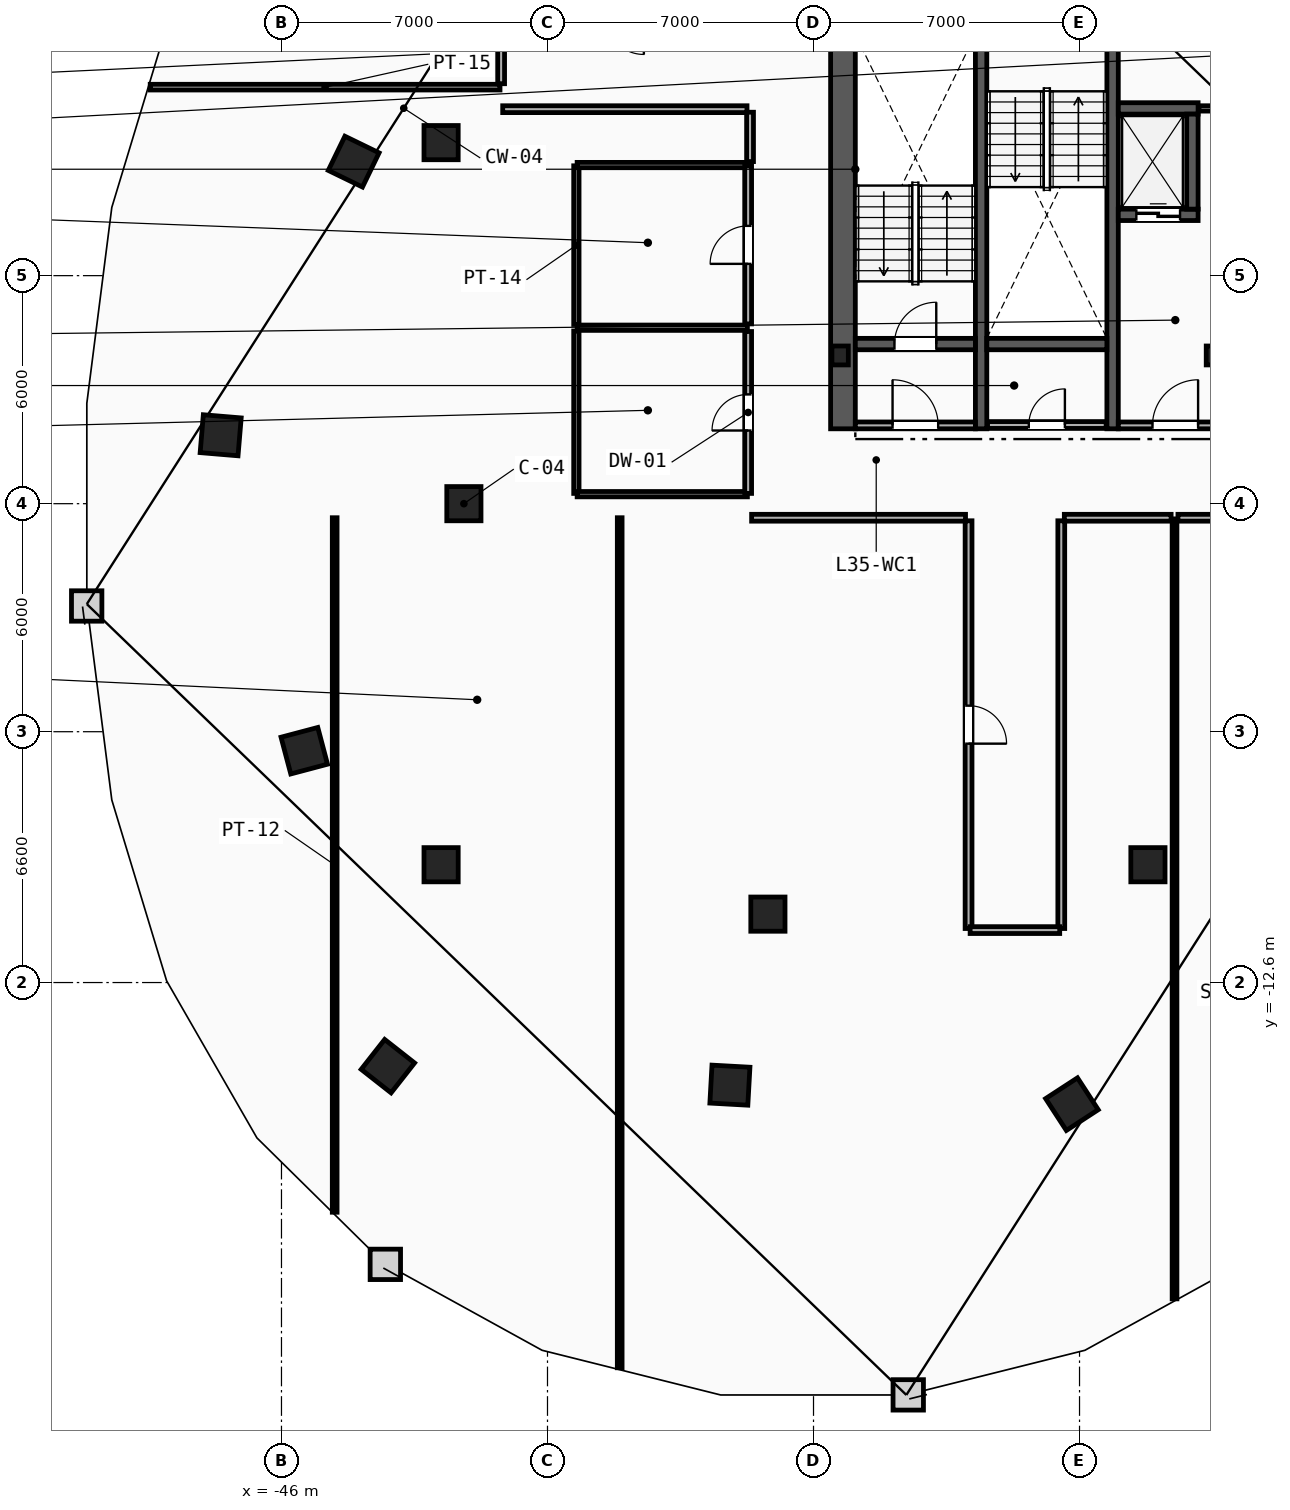
"""IFC4 building model, lengths in metres.
Left out: names, types, materials, properties, quantities, classifications, styles, units other than length and angle.
Written with IfcOpenShell. Run it as: python <this file> out.ifc"""

import sys

from ifc_helpers import new_model, si_unit, direction, frame, frame_2d, origin, origin_2d, place, context, subcontext, project, spatial, rectangle, i_section, extrude, element, fill, save


model = new_model("IFC4")
c1 = context("Model", 3, precision=1e-05, world=origin(), true_north=direction((0.0, 1.0)))
c2 = subcontext(c1, "Body", "Model", "MODEL_VIEW")
j1 = project(units=[si_unit("LENGTHUNIT", "METRE"), si_unit("PLANEANGLEUNIT", "RADIAN")], contexts=[c1])
p1 = place(None, origin())
s1 = spatial("IfcSite", under=j1, at=p1, CompositionType="ELEMENT")
p2 = place(p1, origin())
s2 = spatial("IfcBuilding", under=s1, at=p2, CompositionType="ELEMENT")
p3 = place(p2, frame((0.0, 0.0, 136.8)))
s3 = spatial("IfcBuildingStorey", under=s2, at=p3, CompositionType="ELEMENT", Elevation=136.8)
for number, where, z_axis, x_axis in (
    (1, (-31.3, 3.9, 0.0), (0.0, 0.0, 1.0), (1.0, 0.0, 0.0)),
    (2, (-21.45, 3.9, 0.0), (0.0, 0.0, 1.0), (1.0, 0.0, 0.0)),
):
    element("IfcColumn", number, at=place(p3, frame(where, z_axis=z_axis, x_axis=x_axis)), inside=s3, PredefinedType="COLUMN", context=c2, shape_type="SweptSolid", body=[
        extrude(i_section(OverallWidth=0.432, OverallDepth=0.498, WebThickness=0.056, FlangeThickness=0.089, FilletRadius=0.018, at=origin_2d()), origin(), (0.0, 0.0, 1.0), 3.6),
    ])
for number, where, z_axis, x_axis in (
    (3, (-41.2, 0.0, 0.0), (0.0, 0.0, 1.0), (1.0, 0.0, 0.0)),
    (4, (-41.8, 9.5, 0.0), (0.0, 0.0, 1.0), (1.0, 0.0, 0.0)),
    (5, (-41.8, -9.5, 0.0), (0.0, 0.0, 1.0), (1.0, 0.0, 0.0)),
    (6, (-33.2, -10.8, 0.0), (0.0, 0.0, 1.0), (1.0, 0.0, 0.0)),
    (7, (-23.2, -9.5, 0.0), (0.0, 0.0, 1.0), (1.0, 0.0, 0.0)),
):
    element("IfcColumn", number, at=place(p3, frame(where, z_axis=z_axis, x_axis=x_axis)), inside=s3, PredefinedType="COLUMN", context=c2, shape_type="SweptSolid", body=[
        extrude(rectangle(XDim=0.9, YDim=0.9, at=origin_2d()), origin(), (0.0, 0.0, 1.0), 3.6),
    ])
for number, where, z_axis, x_axis in (
    (8, (-44.1, 9.0, 0.0), (0.0, 0.0, 1.0), (-0.437, -0.899, 0.0)),
    (9, (-47.6, 1.8, 0.0), (0.0, 0.0, 1.0), (-0.084, -0.997, 0.0)),
    (10, (-45.4, -6.5, 0.0), (0.0, 0.0, 1.0), (0.256, -0.967, 0.0)),
    (11, (-43.2, -14.8, 0.0), (0.0, 0.0, 1.0), (0.786, -0.618, 0.0)),
    (12, (-34.2, -15.3, 0.0), (0.0, 0.0, 1.0), (0.998, -0.055, 0.0)),
    (13, (-25.2, -15.8, 0.0), (0.0, 0.0, 1.0), (0.838, 0.546, 0.0)),
):
    element("IfcColumn", number, at=place(p3, frame(where, z_axis=z_axis, x_axis=x_axis)), inside=s3, PredefinedType="COLUMN", context=c2, shape_type="SweptSolid", body=[
        extrude(rectangle(XDim=1.0, YDim=1.0, at=origin_2d()), origin(), (0.0, 0.0, 1.0), 3.6),
    ])
p4 = place(p3, frame((-31.225, 1.97, 0.0), z_axis=(0.0, 0.0, 1.0), x_axis=(0.0, 1.0, 0.0)))
e14 = element("IfcWall", 14, at=p4, inside=s3, PredefinedType="SHEAR", context=c2, shape_type="SweptSolid", body=[
    extrude(rectangle(XDim=13.33, YDim=0.65, at=frame_2d((6.665, 0.0))), origin(), (0.0, 0.0, 1.0), 3.36),
])
for number, where, z_axis, x_axis in (
    (15, (-27.59, 1.97, 0.0), (0.0, 0.0, 1.0), (0.0, 1.0, 0.0)),
    (16, (-24.13, 1.97, 0.0), (0.0, 0.0, 1.0), (0.0, 1.0, 0.0)),
):
    element("IfcWall", number, at=place(p3, frame(where, z_axis=z_axis, x_axis=x_axis)), inside=s3, PredefinedType="SHEAR", context=c2, shape_type="SweptSolid", body=[
        extrude(rectangle(XDim=10.68, YDim=0.3, at=frame_2d((5.34, 0.0))), origin(), (0.0, 0.0, 1.0), 3.36),
    ])
p5 = place(p3, frame((-30.9, 4.2, 0.0), z_axis=(0.0, 0.0, 1.0), x_axis=(1.0, 0.0, 0.0)))
e17 = element("IfcWall", 17, at=p5, inside=s3, PredefinedType="SHEAR", context=c2, shape_type="SweptSolid", body=[
    extrude(rectangle(XDim=3.16, YDim=0.3, at=frame_2d((1.58, 0.0))), origin(), (0.0, 0.0, 1.0), 3.36),
])
p6 = place(p5, frame((1.03, 0.0, 0.0)))
e18 = element("IfcOpeningElement", 18, at=p6, cuts=e17, PredefinedType="OPENING", context=c2, shape_type="SweptSolid", body=[
    extrude(rectangle(XDim=1.1, YDim=2.15, at=frame_2d((0.55, 1.075))), frame((0.0, 0.16, 0.0), z_axis=(0.0, -1.0, 0.0), x_axis=(1.0, 0.0, 0.0)), (0.0, 0.0, 1.0), 0.32),
])
p7 = place(p3, frame((-27.44, 4.2, 0.0), z_axis=(0.0, 0.0, 1.0), x_axis=(1.0, 0.0, 0.0)))
e19 = element("IfcWall", 19, at=p7, inside=s3, PredefinedType="SHEAR", context=c2, shape_type="SweptSolid", body=[
    extrude(rectangle(XDim=3.16, YDim=0.3, at=frame_2d((1.58, 0.0))), origin(), (0.0, 0.0, 1.0), 3.36),
])
p8 = place(p3, frame((-23.98, 2.06, 0.0), z_axis=(0.0, 0.0, 1.0), x_axis=(1.0, 0.0, 0.0)))
e20 = element("IfcWall", 20, at=p8, inside=s3, PredefinedType="PARTITIONING", context=c2, shape_type="SweptSolid", body=[
    extrude(rectangle(XDim=3.0, YDim=0.18, at=frame_2d((1.5, 0.0))), origin(), (0.0, 0.0, 1.0), 3.36),
])
p9 = place(p8, frame((0.9, 0.0, 0.0)))
e21 = element("IfcOpeningElement", 21, at=p9, cuts=e20, PredefinedType="OPENING", context=c2, shape_type="SweptSolid", body=[
    extrude(rectangle(XDim=1.2, YDim=2.15, at=frame_2d((0.6, 1.075))), frame((0.0, 0.1, 0.0), z_axis=(0.0, -1.0, 0.0), x_axis=(1.0, 0.0, 0.0)), (0.0, 0.0, 1.0), 0.2),
])
p10 = place(p3, frame((-30.9, 2.06, 0.0), z_axis=(0.0, 0.0, 1.0), x_axis=(1.0, 0.0, 0.0)))
e22 = element("IfcWall", 22, at=p10, inside=s3, PredefinedType="PARTITIONING", context=c2, shape_type="SweptSolid", body=[
    extrude(rectangle(XDim=3.16, YDim=0.18, at=frame_2d((1.58, 0.0))), origin(), (0.0, 0.0, 1.0), 3.36),
])
p11 = place(p10, frame((0.98, 0.0, 0.0)))
e23 = element("IfcOpeningElement", 23, at=p11, cuts=e22, PredefinedType="OPENING", context=c2, shape_type="SweptSolid", body=[
    extrude(rectangle(XDim=1.2, YDim=2.15, at=frame_2d((0.6, 1.075))), frame((0.0, 0.1, 0.0), z_axis=(0.0, -1.0, 0.0), x_axis=(1.0, 0.0, 0.0)), (0.0, 0.0, 1.0), 0.2),
])
p12 = place(p3, frame((-23.98, 7.6, 0.0), z_axis=(0.0, 0.0, 1.0), x_axis=(1.0, 0.0, 0.0)))
e24 = element("IfcWall", 24, at=p12, inside=s3, PredefinedType="SHEAR", context=c2, shape_type="SweptSolid", body=[
    extrude(rectangle(XDim=2.1, YDim=0.3, at=frame_2d((1.05, 0.0))), origin(), (0.0, 0.0, 1.0), 3.36),
])
p13 = place(p12, frame((0.475, 0.0, 0.0)))
e25 = element("IfcOpeningElement", 25, at=p13, cuts=e24, PredefinedType="OPENING", context=c2, shape_type="SweptSolid", body=[
    extrude(rectangle(XDim=1.15, YDim=2.2, at=frame_2d((0.575, 1.1))), frame((0.0, 0.16, 0.0), z_axis=(0.0, -1.0, 0.0), x_axis=(1.0, 0.0, 0.0)), (0.0, 0.0, 1.0), 0.32),
])
p14 = place(p3, frame((-23.98, 10.4, 0.0), z_axis=(0.0, 0.0, 1.0), x_axis=(1.0, 0.0, 0.0)))
e26 = element("IfcWall", 26, at=p14, inside=s3, PredefinedType="SHEAR", context=c2, shape_type="SweptSolid", body=[
    extrude(rectangle(XDim=2.1, YDim=0.3, at=frame_2d((1.05, 0.0))), origin(), (0.0, 0.0, 1.0), 3.36),
])
p15 = place(p3, frame((-22.03, 7.75, 0.0), z_axis=(0.0, 0.0, 1.0), x_axis=(0.0, 1.0, 0.0)))
e27 = element("IfcWall", 27, at=p15, inside=s3, PredefinedType="SHEAR", context=c2, shape_type="SweptSolid", body=[
    extrude(rectangle(XDim=2.5, YDim=0.3, at=frame_2d((1.25, 0.0))), origin(), (0.0, 0.0, 1.0), 3.36),
])
p16 = place(p3, frame((-21.86, 10.4, 0.0), z_axis=(0.0, 0.0, 1.0), x_axis=(1.0, 0.0, 0.0)))
e28 = element("IfcWall", 28, at=p16, inside=s3, PredefinedType="PARTITIONING", context=c2, shape_type="SweptSolid", body=[
    extrude(rectangle(XDim=0.59, YDim=0.14, at=frame_2d((0.295, 0.0))), origin(), (0.0, 0.0, 1.0), 3.36),
])
p17 = place(p3, frame((-27.42, 2.07, 0.0), z_axis=(0.0, 0.0, 1.0), x_axis=(1.0, 0.0, 0.0)))
e29 = element("IfcWall", 29, at=p17, inside=s3, PredefinedType="PARTITIONING", context=c2, shape_type="SweptSolid", body=[
    extrude(rectangle(XDim=3.12, YDim=0.18, at=frame_2d((1.56, 0.0))), origin(), (0.0, 0.0, 1.0), 3.36),
])
p18 = place(p17, frame((1.085, 0.0, 0.0)))
e30 = element("IfcOpeningElement", 30, at=p18, cuts=e29, PredefinedType="OPENING", context=c2, shape_type="SweptSolid", body=[
    extrude(rectangle(XDim=0.95, YDim=2.1, at=frame_2d((0.475, 1.05))), frame((0.0, 0.1, 0.0), z_axis=(0.0, -1.0, 0.0), x_axis=(1.0, 0.0, 0.0)), (0.0, 0.0, 1.0), 0.2),
])
p19 = place(p3, frame((-38.24, 0.27, 0.0), z_axis=(0.0, 0.0, 1.0), x_axis=(0.0, 1.0, 0.0)))
e31 = element("IfcWall", 31, at=p19, inside=s3, PredefinedType="PARTITIONING", context=c2, shape_type="SweptSolid", body=[
    extrude(rectangle(XDim=4.275, YDim=0.14, at=frame_2d((2.137, 0.0))), origin(), (0.0, 0.0, 1.0), 3.36),
])
p20 = place(p3, frame((-38.24, 4.715, 0.0), z_axis=(0.0, 0.0, 1.0), x_axis=(0.0, 1.0, 0.0)))
e32 = element("IfcWall", 32, at=p20, inside=s3, PredefinedType="PARTITIONING", context=c2, shape_type="SweptSolid", body=[
    extrude(rectangle(XDim=4.175, YDim=0.14, at=frame_2d((2.087, 0.0))), origin(), (0.0, 0.0, 1.0), 3.36),
])
for number, where, z_axis, x_axis in (
    (33, (-38.22, 0.25, 0.0), (0.0, 0.0, 1.0), (1.0, 0.0, 0.0)),
    (34, (-38.22, 4.63, 0.0), (0.0, 0.0, 1.0), (1.0, 0.0, 0.0)),
    (35, (-38.22, 8.91, 0.0), (0.0, 0.0, 1.0), (1.0, 0.0, 0.0)),
):
    element("IfcWall", number, at=place(p3, frame(where, z_axis=z_axis, x_axis=x_axis)), inside=s3, PredefinedType="PARTITIONING", context=c2, shape_type="SweptSolid", body=[
        extrude(rectangle(XDim=4.48, YDim=0.14, at=frame_2d((2.24, 0.0))), origin(), (0.0, 0.0, 1.0), 3.36),
    ])
p21 = place(p3, frame((-33.72, 0.27, 0.0), z_axis=(0.0, 0.0, 1.0), x_axis=(0.0, 1.0, 0.0)))
e36 = element("IfcWall", 36, at=p21, inside=s3, PredefinedType="PARTITIONING", context=c2, shape_type="SweptSolid", body=[
    extrude(rectangle(XDim=4.26, YDim=0.18, at=frame_2d((2.13, 0.0))), origin(), (0.0, 0.0, 1.0), 3.36),
])
p22 = place(p21, frame((1.655, 0.0, 0.0)))
e37 = element("IfcOpeningElement", 37, at=p22, cuts=e36, PredefinedType="OPENING", context=c2, shape_type="SweptSolid", body=[
    extrude(rectangle(XDim=0.95, YDim=2.1, at=frame_2d((0.475, 1.05))), frame((0.0, 0.1, 0.0), z_axis=(0.0, -1.0, 0.0), x_axis=(1.0, 0.0, 0.0)), (0.0, 0.0, 1.0), 0.2),
])
p23 = place(p3, frame((-33.72, 4.73, 0.0), z_axis=(0.0, 0.0, 1.0), x_axis=(0.0, 1.0, 0.0)))
e38 = element("IfcWall", 38, at=p23, inside=s3, PredefinedType="PARTITIONING", context=c2, shape_type="SweptSolid", body=[
    extrude(rectangle(XDim=4.16, YDim=0.18, at=frame_2d((2.08, 0.0))), origin(), (0.0, 0.0, 1.0), 3.36),
])
p24 = place(p23, frame((1.58, 0.0, 0.0)))
e39 = element("IfcOpeningElement", 39, at=p24, cuts=e38, PredefinedType="OPENING", context=c2, shape_type="SweptSolid", body=[
    extrude(rectangle(XDim=1.0, YDim=2.15, at=frame_2d((0.5, 1.075))), frame((0.0, 0.1, 0.0), z_axis=(0.0, -1.0, 0.0), x_axis=(1.0, 0.0, 0.0)), (0.0, 0.0, 1.0), 0.2),
])
p25 = place(p3, frame((-44.6, -18.644, 0.0), z_axis=(0.0, 0.0, 1.0), x_axis=(0.0, 1.0, 0.0)))
e40 = element("IfcWall", 40, at=p25, inside=s3, PredefinedType="PARTITIONING", context=c2, shape_type="SweptSolid", body=[
    extrude(rectangle(XDim=18.274, YDim=0.125, at=frame_2d((9.137, 0.0))), origin(), (0.0, 0.0, 1.0), 2.665),
])
p26 = place(p3, frame((-37.1, -22.736, 0.0), z_axis=(0.0, 0.0, 1.0), x_axis=(0.0, 1.0, 0.0)))
e41 = element("IfcWall", 41, at=p26, inside=s3, PredefinedType="PARTITIONING", context=c2, shape_type="SweptSolid", body=[
    extrude(rectangle(XDim=22.366, YDim=0.125, at=frame_2d((11.183, 0.0))), origin(), (0.0, 0.0, 1.0), 3.36),
])
p27 = place(p3, frame((-22.5, -20.923, 0.0), z_axis=(0.0, 0.0, 1.0), x_axis=(0.0, 1.0, 0.0)))
e42 = element("IfcWall", 42, at=p27, inside=s3, PredefinedType="PARTITIONING", context=c2, shape_type="SweptSolid", body=[
    extrude(rectangle(XDim=20.523, YDim=0.125, at=frame_2d((10.262, 0.0))), origin(), (0.0, 0.0, 1.0), 2.665),
])
p28 = place(p3, frame((-49.454, 10.96, 0.0), z_axis=(0.0, 0.0, 1.0), x_axis=(1.0, 0.0, 0.0)))
e43 = element("IfcWall", 43, at=p28, inside=s3, PredefinedType="PARTITIONING", context=c2, shape_type="SweptSolid", body=[
    extrude(rectangle(XDim=9.204, YDim=0.15, at=frame_2d((4.602, 0.0))), origin(), (0.0, 0.0, 1.0), 3.36),
])
p29 = place(p3, frame((-27.92, -0.45, 0.0), z_axis=(0.0, 0.0, 1.0), x_axis=(0.0, -1.0, 0.0)))
e44 = element("IfcWall", 44, at=p29, inside=s3, PredefinedType="PARTITIONING", context=c2, shape_type="SweptSolid", body=[
    extrude(rectangle(XDim=10.729, YDim=0.18, at=frame_2d((5.364, 0.0))), origin(), (0.0, 0.0, 1.0), 3.36),
])
p30 = place(p29, frame((4.864, 0.0, 0.0)))
e45 = element("IfcOpeningElement", 45, at=p30, cuts=e44, PredefinedType="OPENING", context=c2, shape_type="SweptSolid", body=[
    extrude(rectangle(XDim=1.0, YDim=2.15, at=frame_2d((0.5, 1.075))), frame((0.0, 0.1, 0.0), z_axis=(0.0, -1.0, 0.0), x_axis=(1.0, 0.0, 0.0)), (0.0, 0.0, 1.0), 0.2),
])
p31 = place(p3, frame((-25.48, -11.178, 0.0), z_axis=(0.0, 0.0, 1.0), x_axis=(0.0, 1.0, 0.0)))
e46 = element("IfcWall", 46, at=p31, inside=s3, PredefinedType="PARTITIONING", context=c2, shape_type="SweptSolid", body=[
    extrude(rectangle(XDim=10.729, YDim=0.18, at=frame_2d((5.364, 0.0))), origin(), (0.0, 0.0, 1.0), 3.36),
])
p32 = place(p3, frame((-40.178, 10.38, 0.0), z_axis=(0.0, 0.0, 1.0), x_axis=(1.0, 0.0, 0.0)))
e47 = element("IfcWall", 47, at=p32, inside=s3, PredefinedType="PARTITIONING", context=c2, shape_type="SweptSolid", body=[
    extrude(rectangle(XDim=6.428, YDim=0.18, at=frame_2d((3.214, 0.0))), origin(), (0.0, 0.0, 1.0), 3.36),
])
p33 = place(p3, frame((-33.628, -0.37, 0.0), z_axis=(0.0, 0.0, 1.0), x_axis=(1.0, 0.0, 0.0)))
e48 = element("IfcWall", 48, at=p33, inside=s3, PredefinedType="PARTITIONING", context=c2, shape_type="SweptSolid", body=[
    extrude(rectangle(XDim=5.628, YDim=0.18, at=frame_2d((2.814, 0.0))), origin(), (0.0, 0.0, 1.0), 3.36),
])
p34 = place(p3, frame((-25.4, -0.37, 0.0), z_axis=(0.0, 0.0, 1.0), x_axis=(1.0, 0.0, 0.0)))
e49 = element("IfcWall", 49, at=p34, inside=s3, PredefinedType="PARTITIONING", context=c2, shape_type="SweptSolid", body=[
    extrude(rectangle(XDim=2.81, YDim=0.18, at=frame_2d((1.405, 0.0))), origin(), (0.0, 0.0, 1.0), 3.36),
])
p35 = place(p3, frame((-27.878, -11.22, 0.0), z_axis=(0.0, 0.0, 1.0), x_axis=(1.0, 0.0, 0.0)))
e50 = element("IfcWall", 50, at=p35, inside=s3, PredefinedType="PARTITIONING", context=c2, shape_type="SweptSolid", body=[
    extrude(rectangle(XDim=2.357, YDim=0.18, at=frame_2d((1.178, 0.0))), origin(), (0.0, 0.0, 1.0), 3.36),
])
p36 = place(p3, frame((-33.67, 10.3, 0.0), z_axis=(0.0, 0.0, 1.0), x_axis=(0.0, -1.0, 0.0)))
e51 = element("IfcWall", 51, at=p36, inside=s3, PredefinedType="PARTITIONING", context=c2, shape_type="SweptSolid", body=[
    extrude(rectangle(XDim=1.299, YDim=0.18, at=frame_2d((0.649, 0.0))), origin(), (0.0, 0.0, 1.0), 3.36),
])
p37 = place(p3, frame((-22.41, -0.37, 0.0), z_axis=(0.0, 0.0, 1.0), x_axis=(1.0, 0.0, 0.0)))
e52 = element("IfcWall", 52, at=p37, inside=s3, PredefinedType="PARTITIONING", context=c2, shape_type="SweptSolid", body=[
    extrude(rectangle(XDim=5.588, YDim=0.18, at=frame_2d((2.794, 0.0))), origin(), (0.0, 0.0, 1.0), 3.36),
])
p38 = place(p37, frame((2.294, 0.0, 0.0)))
e53 = element("IfcOpeningElement", 53, at=p38, cuts=e52, PredefinedType="OPENING", context=c2, shape_type="SweptSolid", body=[
    extrude(rectangle(XDim=1.0, YDim=2.15, at=frame_2d((0.5, 1.075))), frame((0.0, 0.1, 0.0), z_axis=(0.0, -1.0, 0.0), x_axis=(1.0, 0.0, 0.0)), (0.0, 0.0, 1.0), 0.2),
])
p39 = place(p3, frame((-40.22, 12.779, 0.0), z_axis=(0.0, 0.0, 1.0), x_axis=(0.0, -1.0, 0.0)))
e54 = element("IfcWall", 54, at=p39, inside=s3, PredefinedType="PARTITIONING", context=c2, shape_type="SweptSolid", body=[
    extrude(rectangle(XDim=1.729, YDim=0.18, at=frame_2d((0.864, 0.0))), origin(), (0.0, 0.0, 1.0), 3.36),
])
p40 = place(p6, origin())
e55 = element("IfcDoor", 55, at=p40, inside=s3, OperationType="SINGLE_SWING_RIGHT", PredefinedType="DOOR", context=c2, shape_type="SweptSolid", body=[
    extrude(rectangle(XDim=1.1, YDim=2.15, at=frame_2d((0.55, 1.075))), frame((0.0, 0.025, 0.0), z_axis=(0.0, -1.0, 0.0), x_axis=(1.0, 0.0, 0.0)), (0.0, 0.0, 1.0), 0.05),
])
fill(e18, e55)
p41 = place(p9, origin())
e56 = element("IfcDoor", 56, at=p41, inside=s3, OperationType="SINGLE_SWING_RIGHT", PredefinedType="DOOR", context=c2, shape_type="SweptSolid", body=[
    extrude(rectangle(XDim=1.2, YDim=2.15, at=frame_2d((0.6, 1.075))), frame((0.0, 0.025, 0.0), z_axis=(0.0, -1.0, 0.0), x_axis=(1.0, 0.0, 0.0)), (0.0, 0.0, 1.0), 0.05),
])
fill(e21, e56)
p42 = place(p11, origin())
e57 = element("IfcDoor", 57, at=p42, inside=s3, OperationType="SINGLE_SWING_LEFT", PredefinedType="DOOR", context=c2, shape_type="SweptSolid", body=[
    extrude(rectangle(XDim=1.2, YDim=2.15, at=frame_2d((0.6, 1.075))), frame((0.0, 0.025, 0.0), z_axis=(0.0, -1.0, 0.0), x_axis=(1.0, 0.0, 0.0)), (0.0, 0.0, 1.0), 0.05),
])
fill(e23, e57)
p43 = place(p13, origin())
e58 = element("IfcDoor", 58, at=p43, inside=s3, OperationType="SLIDING_TO_LEFT", PredefinedType="TRAPDOOR", context=c2, shape_type="SweptSolid", body=[
    extrude(rectangle(XDim=1.15, YDim=2.2, at=frame_2d((0.575, 1.1))), frame((0.0, 0.025, 0.0), z_axis=(0.0, -1.0, 0.0), x_axis=(1.0, 0.0, 0.0)), (0.0, 0.0, 1.0), 0.05),
])
fill(e25, e58)
p44 = place(p30, origin())
e59 = element("IfcDoor", 59, at=p44, inside=s3, OperationType="SINGLE_SWING_RIGHT", PredefinedType="DOOR", context=c2, shape_type="SweptSolid", body=[
    extrude(rectangle(XDim=1.0, YDim=2.15, at=frame_2d((0.5, 1.075))), frame((0.0, 0.025, 0.0), z_axis=(0.0, -1.0, 0.0), x_axis=(1.0, 0.0, 0.0)), (0.0, 0.0, 1.0), 0.05),
])
fill(e45, e59)
p45 = place(p22, origin())
e60 = element("IfcDoor", 60, at=p45, inside=s3, OperationType="SINGLE_SWING_LEFT", PredefinedType="DOOR", context=c2, shape_type="SweptSolid", body=[
    extrude(rectangle(XDim=0.95, YDim=2.1, at=frame_2d((0.475, 1.05))), frame((0.0, 0.025, 0.0), z_axis=(0.0, -1.0, 0.0), x_axis=(1.0, 0.0, 0.0)), (0.0, 0.0, 1.0), 0.05),
])
fill(e37, e60)
p46 = place(p24, origin())
e61 = element("IfcDoor", 61, at=p46, inside=s3, OperationType="SINGLE_SWING_LEFT", PredefinedType="DOOR", context=c2, shape_type="SweptSolid", body=[
    extrude(rectangle(XDim=1.0, YDim=2.15, at=frame_2d((0.5, 1.075))), frame((0.0, 0.025, 0.0), z_axis=(0.0, -1.0, 0.0), x_axis=(1.0, 0.0, 0.0)), (0.0, 0.0, 1.0), 0.05),
])
fill(e39, e61)
p47 = place(p18, origin())
e62 = element("IfcDoor", 62, at=p47, inside=s3, OperationType="SINGLE_SWING_RIGHT", PredefinedType="DOOR", context=c2, shape_type="SweptSolid", body=[
    extrude(rectangle(XDim=0.95, YDim=2.1, at=frame_2d((0.475, 1.05))), frame((0.0, 0.025, 0.0), z_axis=(0.0, -1.0, 0.0), x_axis=(1.0, 0.0, 0.0)), (0.0, 0.0, 1.0), 0.05),
])
fill(e30, e62)
save(model, sys.argv[1])
